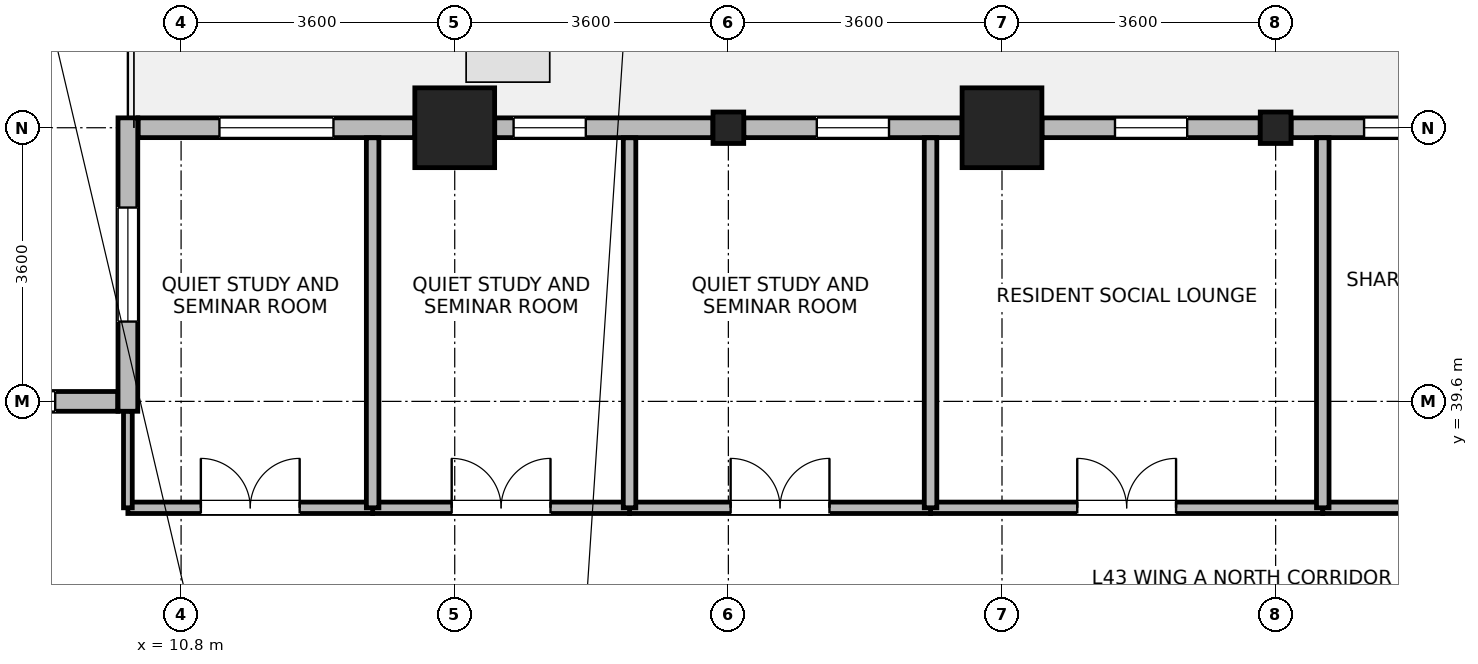
"""IFC4 building model, lengths in metres.
Left out: names, types, materials, properties, quantities, classifications, styles, units other than length and angle.
Written with IfcOpenShell. Run it as: python <this file> out.ifc"""

import sys

from ifc_helpers import new_model, si_unit, direction, frame, frame_2d, origin, origin_2d, place, context, subcontext, project, spatial, rectangle, i_section, extrude, source, transform, mapped, element, fill, save


model = new_model("IFC4")
c1 = context("Model", 3, precision=1e-05, world=origin(), true_north=direction((0.0, 1.0)))
c2 = subcontext(c1, "Body", "Model", "MODEL_VIEW")
j1 = project(units=[si_unit("LENGTHUNIT", "METRE"), si_unit("PLANEANGLEUNIT", "RADIAN")], contexts=[c1])
p1 = place(None, origin())
s1 = spatial("IfcSite", under=j1, at=p1, CompositionType="ELEMENT")
p2 = place(p1, origin())
s2 = spatial("IfcBuilding", under=s1, at=p2, CompositionType="ELEMENT")
p3 = place(p2, frame((0.0, 0.0, 169.8)))
s3 = spatial("IfcBuildingStorey", under=s2, at=p3, CompositionType="ELEMENT", Elevation=169.8)
m1 = source(origin(), c2, "Body", "SweptSolid", [
    extrude(rectangle(XDim=1.05, YDim=1.05, at=origin_2d()), origin(), (0.0, 0.0, 1.0), 3.7),
])
for number, where, z_axis, x_axis in (
    (1, (14.4, 43.2, 0.0), (0.0, 0.0, 1.0), (1.0, 0.0, 0.0)),
    (2, (21.6, 43.2, 0.0), (0.0, 0.0, 1.0), (1.0, 0.0, 0.0)),
):
    element("IfcColumn", number, at=place(p3, frame(where, z_axis=z_axis, x_axis=x_axis)), inside=s3, PredefinedType="COLUMN", context=c2, shape_type="MappedRepresentation", body=[
        mapped(m1, transform((0.0, 0.0, 0.0), x_axis=(1.0, 0.0, 0.0), y_axis=(0.0, 1.0, 0.0), z_axis=(0.0, 0.0, 1.0), scale=1.0)),
    ])
m2 = source(origin(), c2, "Body", "SweptSolid", [
    extrude(i_section(OverallWidth=0.404, OverallDepth=0.414, WebThickness=0.021, FlangeThickness=0.028, FilletRadius=0.015, at=origin_2d()), origin(), (0.0, 0.0, 1.0), 3.7),
])
for number, where, z_axis, x_axis in (
    (3, (18.0, 43.2, 0.0), (0.0, 0.0, 1.0), (1.0, 0.0, 0.0)),
    (4, (25.2, 43.2, 0.0), (0.0, 0.0, 1.0), (1.0, 0.0, 0.0)),
):
    element("IfcColumn", number, at=place(p3, frame(where, z_axis=z_axis, x_axis=x_axis)), inside=s3, PredefinedType="COLUMN", context=c2, shape_type="MappedRepresentation", body=[
        mapped(m2, transform((0.0, 0.0, 0.0), x_axis=(1.0, 0.0, 0.0), y_axis=(0.0, 1.0, 0.0), z_axis=(0.0, 0.0, 1.0), scale=1.0)),
    ])
p4 = place(p3, frame((25.403, 43.2, 0.0), z_axis=(0.0, 0.0, 1.0), x_axis=(1.0, 0.0, 0.0)))
e5 = element("IfcWall", 5, at=p4, inside=s3, PredefinedType="STANDARD", context=c2, shape_type="SweptSolid", body=[
    extrude(rectangle(XDim=2.871, YDim=0.26, at=frame_2d((1.436, 0.0))), origin(), (0.0, 0.0, 1.0), 2.99),
])
p5 = place(p4, frame((0.96, 0.0, 0.85)))
e6 = element("IfcOpeningElement", 6, at=p5, cuts=e5, PredefinedType="OPENING", context=c2, shape_type="SweptSolid", body=[
    extrude(rectangle(XDim=0.95, YDim=1.75, at=frame_2d((0.475, 0.875))), frame((0.0, 0.14, 0.0), z_axis=(0.0, -1.0, 0.0), x_axis=(1.0, 0.0, 0.0)), (0.0, 0.0, 1.0), 0.28),
])
p6 = place(p3, frame((22.126, 43.2, 0.0), z_axis=(0.0, 0.0, 1.0), x_axis=(1.0, 0.0, 0.0)))
e7 = element("IfcWall", 7, at=p6, inside=s3, PredefinedType="STANDARD", context=c2, shape_type="SweptSolid", body=[
    extrude(rectangle(XDim=2.871, YDim=0.26, at=frame_2d((1.436, 0.0))), origin(), (0.0, 0.0, 1.0), 2.99),
])
p7 = place(p6, frame((0.96, 0.0, 0.85)))
e8 = element("IfcOpeningElement", 8, at=p7, cuts=e7, PredefinedType="OPENING", context=c2, shape_type="SweptSolid", body=[
    extrude(rectangle(XDim=0.95, YDim=1.75, at=frame_2d((0.475, 0.875))), frame((0.0, 0.14, 0.0), z_axis=(0.0, -1.0, 0.0), x_axis=(1.0, 0.0, 0.0)), (0.0, 0.0, 1.0), 0.28),
])
p8 = place(p3, frame((18.203, 43.2, 0.0), z_axis=(0.0, 0.0, 1.0), x_axis=(1.0, 0.0, 0.0)))
e9 = element("IfcWall", 9, at=p8, inside=s3, PredefinedType="STANDARD", context=c2, shape_type="SweptSolid", body=[
    extrude(rectangle(XDim=2.871, YDim=0.26, at=frame_2d((1.436, 0.0))), origin(), (0.0, 0.0, 1.0), 2.99),
])
p9 = place(p8, frame((0.96, 0.0, 0.85)))
e10 = element("IfcOpeningElement", 10, at=p9, cuts=e9, PredefinedType="OPENING", context=c2, shape_type="SweptSolid", body=[
    extrude(rectangle(XDim=0.95, YDim=1.75, at=frame_2d((0.475, 0.875))), frame((0.0, 0.14, 0.0), z_axis=(0.0, -1.0, 0.0), x_axis=(1.0, 0.0, 0.0)), (0.0, 0.0, 1.0), 0.28),
])
p10 = place(p3, frame((14.926, 43.2, 0.0), z_axis=(0.0, 0.0, 1.0), x_axis=(1.0, 0.0, 0.0)))
e11 = element("IfcWall", 11, at=p10, inside=s3, PredefinedType="STANDARD", context=c2, shape_type="SweptSolid", body=[
    extrude(rectangle(XDim=2.871, YDim=0.26, at=frame_2d((1.436, 0.0))), origin(), (0.0, 0.0, 1.0), 2.99),
])
p11 = place(p10, frame((0.249, 0.0, 0.85)))
e12 = element("IfcOpeningElement", 12, at=p11, cuts=e11, PredefinedType="OPENING", context=c2, shape_type="SweptSolid", body=[
    extrude(rectangle(XDim=0.95, YDim=1.75, at=frame_2d((0.475, 0.875))), frame((0.0, 0.14, 0.0), z_axis=(0.0, -1.0, 0.0), x_axis=(1.0, 0.0, 0.0)), (0.0, 0.0, 1.0), 0.28),
])
p12 = place(p3, frame((10.235, 43.2, 0.0), z_axis=(0.0, 0.0, 1.0), x_axis=(1.0, 0.0, 0.0)))
e13 = element("IfcWall", 13, at=p12, inside=s3, PredefinedType="STANDARD", context=c2, shape_type="SweptSolid", body=[
    extrude(rectangle(XDim=3.639, YDim=0.26, at=frame_2d((1.819, 0.0))), origin(), (0.0, 0.0, 1.0), 3.44),
])
p13 = place(p12, frame((1.07, 0.0, 0.85)))
e14 = element("IfcOpeningElement", 14, at=p13, cuts=e13, PredefinedType="OPENING", context=c2, shape_type="SweptSolid", body=[
    extrude(rectangle(XDim=1.5, YDim=1.85, at=frame_2d((0.75, 0.925))), frame((0.0, 0.14, 0.0), z_axis=(0.0, -1.0, 0.0), x_axis=(1.0, 0.0, 0.0)), (0.0, 0.0, 1.0), 0.28),
])
p14 = place(p3, frame((10.1, 39.47, 0.0), z_axis=(0.0, 0.0, 1.0), x_axis=(0.0, 1.0, 0.0)))
e15 = element("IfcWall", 15, at=p14, inside=s3, PredefinedType="STANDARD", context=c2, shape_type="SweptSolid", body=[
    extrude(rectangle(XDim=3.86, YDim=0.26, at=frame_2d((1.93, 0.0))), origin(), (0.0, 0.0, 1.0), 3.44),
])
p15 = place(p14, frame((1.18, 0.0, 0.85)))
e16 = element("IfcOpeningElement", 16, at=p15, cuts=e15, PredefinedType="OPENING", context=c2, shape_type="SweptSolid", body=[
    extrude(rectangle(XDim=1.5, YDim=1.85, at=frame_2d((0.75, 0.925))), frame((0.0, 0.14, 0.0), z_axis=(0.0, -1.0, 0.0), x_axis=(1.0, 0.0, 0.0)), (0.0, 0.0, 1.0), 0.28),
])
p16 = place(p3, frame((0.537, 39.6, 0.0), z_axis=(0.0, 0.0, 1.0), x_axis=(1.0, 0.0, 0.0)))
e17 = element("IfcWall", 17, at=p16, inside=s3, PredefinedType="STANDARD", context=c2, shape_type="SweptSolid", body=[
    extrude(rectangle(XDim=9.428, YDim=0.26, at=frame_2d((4.714, 0.0))), origin(), (0.0, 0.0, 1.0), 3.44),
])
p17 = place(p16, frame((0.821, 0.0, 0.85)))
e18 = element("IfcOpeningElement", 18, at=p17, cuts=e17, PredefinedType="OPENING", context=c2, shape_type="SweptSolid", body=[
    extrude(rectangle(XDim=1.5, YDim=1.85, at=frame_2d((0.75, 0.925))), frame((0.0, 0.14, 0.0), z_axis=(0.0, -1.0, 0.0), x_axis=(1.0, 0.0, 0.0)), (0.0, 0.0, 1.0), 0.28),
])
p18 = place(p16, frame((3.964, 0.0, 0.85)))
e19 = element("IfcOpeningElement", 19, at=p18, cuts=e17, PredefinedType="OPENING", context=c2, shape_type="SweptSolid", body=[
    extrude(rectangle(XDim=1.5, YDim=1.85, at=frame_2d((0.75, 0.925))), frame((0.0, 0.14, 0.0), z_axis=(0.0, -1.0, 0.0), x_axis=(1.0, 0.0, 0.0)), (0.0, 0.0, 1.0), 0.28),
])
p19 = place(p16, frame((7.107, 0.0, 0.85)))
e20 = element("IfcOpeningElement", 20, at=p19, cuts=e17, PredefinedType="OPENING", context=c2, shape_type="SweptSolid", body=[
    extrude(rectangle(XDim=1.5, YDim=1.85, at=frame_2d((0.75, 0.925))), frame((0.0, 0.14, 0.0), z_axis=(0.0, -1.0, 0.0), x_axis=(1.0, 0.0, 0.0)), (0.0, 0.0, 1.0), 0.28),
])
p20 = place(p3, frame((20.66, 38.2, 0.0), z_axis=(0.0, 0.0, 1.0), x_axis=(1.0, 0.0, 0.0)))
e21 = element("IfcWall", 21, at=p20, inside=s3, PredefinedType="PARTITIONING", context=c2, shape_type="SweptSolid", body=[
    extrude(rectangle(XDim=5.16, YDim=0.15, at=frame_2d((2.58, 0.0))), origin(), (0.0, 0.0, 1.0), 3.44),
])
p21 = place(p20, frame((1.93, 0.0, 0.0)))
e22 = element("IfcOpeningElement", 22, at=p21, cuts=e21, PredefinedType="OPENING", context=c2, shape_type="SweptSolid", body=[
    extrude(rectangle(XDim=1.3, YDim=2.12, at=frame_2d((0.65, 1.06))), frame((0.0, 0.085, 0.0), z_axis=(0.0, -1.0, 0.0), x_axis=(1.0, 0.0, 0.0)), (0.0, 0.0, 1.0), 0.17),
])
p22 = place(p3, frame((25.82, 38.2, 0.0), z_axis=(0.0, 0.0, 1.0), x_axis=(1.0, 0.0, 0.0)))
e23 = element("IfcWall", 23, at=p22, inside=s3, PredefinedType="PARTITIONING", context=c2, shape_type="SweptSolid", body=[
    extrude(rectangle(XDim=4.74, YDim=0.15, at=frame_2d((2.37, 0.0))), origin(), (0.0, 0.0, 1.0), 3.44),
])
p23 = place(p22, frame((1.92, 0.0, 0.0)))
e24 = element("IfcOpeningElement", 24, at=p23, cuts=e23, PredefinedType="OPENING", context=c2, shape_type="SweptSolid", body=[
    extrude(rectangle(XDim=0.9, YDim=2.08, at=frame_2d((0.45, 1.04))), frame((0.0, 0.085, 0.0), z_axis=(0.0, -1.0, 0.0), x_axis=(1.0, 0.0, 0.0)), (0.0, 0.0, 1.0), 0.17),
])
p24 = place(p3, frame((16.7, 38.2, 0.0), z_axis=(0.0, 0.0, 1.0), x_axis=(1.0, 0.0, 0.0)))
e25 = element("IfcWall", 25, at=p24, inside=s3, PredefinedType="PARTITIONING", context=c2, shape_type="SweptSolid", body=[
    extrude(rectangle(XDim=3.96, YDim=0.15, at=frame_2d((1.98, 0.0))), origin(), (0.0, 0.0, 1.0), 3.44),
])
p25 = place(p24, frame((1.33, 0.0, 0.0)))
e26 = element("IfcOpeningElement", 26, at=p25, cuts=e25, PredefinedType="OPENING", context=c2, shape_type="SweptSolid", body=[
    extrude(rectangle(XDim=1.3, YDim=2.12, at=frame_2d((0.65, 1.06))), frame((0.0, 0.085, 0.0), z_axis=(0.0, -1.0, 0.0), x_axis=(1.0, 0.0, 0.0)), (0.0, 0.0, 1.0), 0.17),
])
p26 = place(p3, frame((13.32, 38.2, 0.0), z_axis=(0.0, 0.0, 1.0), x_axis=(1.0, 0.0, 0.0)))
e27 = element("IfcWall", 27, at=p26, inside=s3, PredefinedType="PARTITIONING", context=c2, shape_type="SweptSolid", body=[
    extrude(rectangle(XDim=3.38, YDim=0.15, at=frame_2d((1.69, 0.0))), origin(), (0.0, 0.0, 1.0), 3.44),
])
p27 = place(p26, frame((1.04, 0.0, 0.0)))
e28 = element("IfcOpeningElement", 28, at=p27, cuts=e27, PredefinedType="OPENING", context=c2, shape_type="SweptSolid", body=[
    extrude(rectangle(XDim=1.3, YDim=2.12, at=frame_2d((0.65, 1.06))), frame((0.0, 0.085, 0.0), z_axis=(0.0, -1.0, 0.0), x_axis=(1.0, 0.0, 0.0)), (0.0, 0.0, 1.0), 0.17),
])
p28 = place(p3, frame((10.1, 38.2, 0.0), z_axis=(0.0, 0.0, 1.0), x_axis=(1.0, 0.0, 0.0)))
e29 = element("IfcWall", 29, at=p28, inside=s3, PredefinedType="PARTITIONING", context=c2, shape_type="SweptSolid", body=[
    extrude(rectangle(XDim=3.22, YDim=0.15, at=frame_2d((1.61, 0.0))), origin(), (0.0, 0.0, 1.0), 3.44),
])
p29 = place(p28, frame((0.96, 0.0, 0.0)))
e30 = element("IfcOpeningElement", 30, at=p29, cuts=e29, PredefinedType="OPENING", context=c2, shape_type="SweptSolid", body=[
    extrude(rectangle(XDim=1.3, YDim=2.12, at=frame_2d((0.65, 1.06))), frame((0.0, 0.085, 0.0), z_axis=(0.0, -1.0, 0.0), x_axis=(1.0, 0.0, 0.0)), (0.0, 0.0, 1.0), 0.17),
])
p30 = place(p3, frame((10.1, 38.2, 0.0), z_axis=(0.0, 0.0, 1.0), x_axis=(0.0, 1.0, 0.0)))
e31 = element("IfcWall", 31, at=p30, inside=s3, PredefinedType="PARTITIONING", context=c2, shape_type="SweptSolid", body=[
    extrude(rectangle(XDim=1.268, YDim=0.115, at=frame_2d((0.634, 0.0))), origin(), (0.0, 0.0, 1.0), 3.44),
])
for number, where, z_axis, x_axis in (
    (32, (13.32, 38.2, 0.0), (0.0, 0.0, 1.0), (0.0, 1.0, 0.0)),
    (33, (16.7, 38.2, 0.0), (0.0, 0.0, 1.0), (0.0, 1.0, 0.0)),
    (34, (20.66, 38.2, 0.0), (0.0, 0.0, 1.0), (0.0, 1.0, 0.0)),
    (35, (25.82, 38.2, 0.0), (0.0, 0.0, 1.0), (0.0, 1.0, 0.0)),
):
    element("IfcWall", number, at=place(p3, frame(where, z_axis=z_axis, x_axis=x_axis)), inside=s3, PredefinedType="PARTITIONING", context=c2, shape_type="SweptSolid", body=[
        extrude(rectangle(XDim=4.868, YDim=0.165, at=frame_2d((2.434, 0.0))), origin(), (0.0, 0.0, 1.0), 3.44),
    ])
p31 = place(p5, origin())
e36 = element("IfcWindow", 36, at=p31, inside=s3, PartitioningType="SINGLE_PANEL", PredefinedType="WINDOW", context=c2, shape_type="SweptSolid", body=[
    extrude(rectangle(XDim=0.95, YDim=1.75, at=frame_2d((0.475, 0.875))), frame((0.0, 0.03, 0.0), z_axis=(0.0, -1.0, 0.0), x_axis=(1.0, 0.0, 0.0)), (0.0, 0.0, 1.0), 0.06),
])
fill(e6, e36)
p32 = place(p7, origin())
e37 = element("IfcWindow", 37, at=p32, inside=s3, PartitioningType="SINGLE_PANEL", PredefinedType="WINDOW", context=c2, shape_type="SweptSolid", body=[
    extrude(rectangle(XDim=0.95, YDim=1.75, at=frame_2d((0.475, 0.875))), frame((0.0, 0.03, 0.0), z_axis=(0.0, -1.0, 0.0), x_axis=(1.0, 0.0, 0.0)), (0.0, 0.0, 1.0), 0.06),
])
fill(e8, e37)
p33 = place(p9, origin())
e38 = element("IfcWindow", 38, at=p33, inside=s3, PartitioningType="SINGLE_PANEL", PredefinedType="WINDOW", context=c2, shape_type="SweptSolid", body=[
    extrude(rectangle(XDim=0.95, YDim=1.75, at=frame_2d((0.475, 0.875))), frame((0.0, 0.03, 0.0), z_axis=(0.0, -1.0, 0.0), x_axis=(1.0, 0.0, 0.0)), (0.0, 0.0, 1.0), 0.06),
])
fill(e10, e38)
p34 = place(p11, origin())
e39 = element("IfcWindow", 39, at=p34, inside=s3, PartitioningType="SINGLE_PANEL", PredefinedType="WINDOW", context=c2, shape_type="SweptSolid", body=[
    extrude(rectangle(XDim=0.95, YDim=1.75, at=frame_2d((0.475, 0.875))), frame((0.0, 0.03, 0.0), z_axis=(0.0, -1.0, 0.0), x_axis=(1.0, 0.0, 0.0)), (0.0, 0.0, 1.0), 0.06),
])
fill(e12, e39)
p35 = place(p13, origin())
e40 = element("IfcWindow", 40, at=p35, inside=s3, PartitioningType="SINGLE_PANEL", PredefinedType="WINDOW", context=c2, shape_type="SweptSolid", body=[
    extrude(rectangle(XDim=1.5, YDim=1.85, at=frame_2d((0.75, 0.925))), frame((0.0, 0.03, 0.0), z_axis=(0.0, -1.0, 0.0), x_axis=(1.0, 0.0, 0.0)), (0.0, 0.0, 1.0), 0.06),
])
fill(e14, e40)
p36 = place(p15, origin())
e41 = element("IfcWindow", 41, at=p36, inside=s3, PartitioningType="SINGLE_PANEL", PredefinedType="WINDOW", context=c2, shape_type="SweptSolid", body=[
    extrude(rectangle(XDim=1.5, YDim=1.85, at=frame_2d((0.75, 0.925))), frame((0.0, 0.03, 0.0), z_axis=(0.0, -1.0, 0.0), x_axis=(1.0, 0.0, 0.0)), (0.0, 0.0, 1.0), 0.06),
])
fill(e16, e41)
p37 = place(p19, origin())
e42 = element("IfcWindow", 42, at=p37, inside=s3, PartitioningType="SINGLE_PANEL", PredefinedType="WINDOW", context=c2, shape_type="SweptSolid", body=[
    extrude(rectangle(XDim=1.5, YDim=1.85, at=frame_2d((0.75, 0.925))), frame((0.0, 0.03, 0.0), z_axis=(0.0, -1.0, 0.0), x_axis=(1.0, 0.0, 0.0)), (0.0, 0.0, 1.0), 0.06),
])
fill(e20, e42)
p38 = place(p21, origin())
e43 = element("IfcDoor", 43, at=p38, inside=s3, OperationType="DOUBLE_DOOR_SINGLE_SWING", PredefinedType="DOOR", context=c2, shape_type="SweptSolid", body=[
    extrude(rectangle(XDim=1.3, YDim=2.12, at=frame_2d((0.65, 1.06))), frame((0.0, 0.025, 0.0), z_axis=(0.0, -1.0, 0.0), x_axis=(1.0, 0.0, 0.0)), (0.0, 0.0, 1.0), 0.05),
])
fill(e22, e43)
p39 = place(p25, origin())
e44 = element("IfcDoor", 44, at=p39, inside=s3, OperationType="DOUBLE_DOOR_SINGLE_SWING", PredefinedType="DOOR", context=c2, shape_type="SweptSolid", body=[
    extrude(rectangle(XDim=1.3, YDim=2.12, at=frame_2d((0.65, 1.06))), frame((0.0, 0.025, 0.0), z_axis=(0.0, -1.0, 0.0), x_axis=(1.0, 0.0, 0.0)), (0.0, 0.0, 1.0), 0.05),
])
fill(e26, e44)
p40 = place(p27, origin())
e45 = element("IfcDoor", 45, at=p40, inside=s3, OperationType="DOUBLE_DOOR_SINGLE_SWING", PredefinedType="DOOR", context=c2, shape_type="SweptSolid", body=[
    extrude(rectangle(XDim=1.3, YDim=2.12, at=frame_2d((0.65, 1.06))), frame((0.0, 0.025, 0.0), z_axis=(0.0, -1.0, 0.0), x_axis=(1.0, 0.0, 0.0)), (0.0, 0.0, 1.0), 0.05),
])
fill(e28, e45)
p41 = place(p29, origin())
e46 = element("IfcDoor", 46, at=p41, inside=s3, OperationType="DOUBLE_DOOR_SINGLE_SWING", PredefinedType="DOOR", context=c2, shape_type="SweptSolid", body=[
    extrude(rectangle(XDim=1.3, YDim=2.12, at=frame_2d((0.65, 1.06))), frame((0.0, 0.025, 0.0), z_axis=(0.0, -1.0, 0.0), x_axis=(1.0, 0.0, 0.0)), (0.0, 0.0, 1.0), 0.05),
])
fill(e30, e46)
save(model, sys.argv[1])
